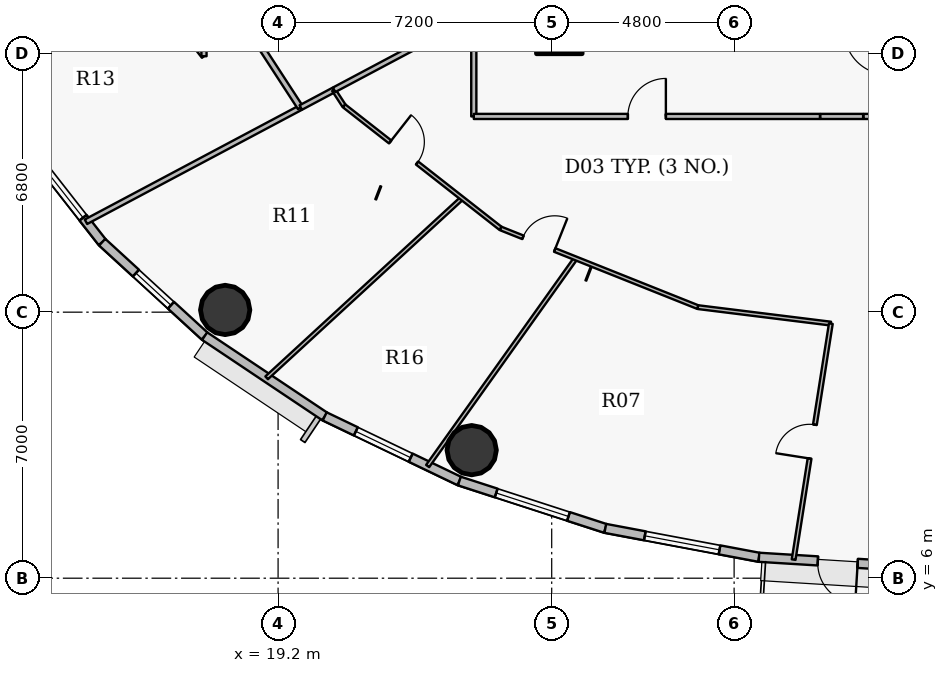
"""IFC4 building model, lengths in metres.
Left out: names, types, materials, properties, quantities, classifications, styles, units other than length and angle.
Written with IfcOpenShell. Run it as: python <this file> out.ifc"""

import sys

from ifc_helpers import new_model, si_unit, direction, frame, frame_2d, origin, origin_2d, place, context, subcontext, project, spatial, rectangle, hollow_circle, extrude, source, transform, mapped, element, fill, save


model = new_model("IFC4")
c1 = context("Model", 3, precision=1e-05, world=origin(), true_north=direction((0.0, 1.0)))
c2 = subcontext(c1, "Body", "Model", "MODEL_VIEW")
j1 = project(units=[si_unit("LENGTHUNIT", "METRE"), si_unit("PLANEANGLEUNIT", "RADIAN")], contexts=[c1])
p1 = place(None, origin())
s1 = spatial("IfcSite", under=j1, at=p1, CompositionType="ELEMENT")
p2 = place(p1, origin())
s2 = spatial("IfcBuilding", under=s1, at=p2, CompositionType="ELEMENT")
p3 = place(p2, frame((0.0, 0.0, 193.65)))
s3 = spatial("IfcBuildingStorey", under=s2, at=p3, CompositionType="ELEMENT", Elevation=193.65)
p4 = place(p3, frame((26.6, 20.4, 0.0), z_axis=(0.0, 0.0, 1.0), x_axis=(1.0, 0.0, 0.0)))
e1 = element("IfcColumn", 1, at=p4, inside=s3, PredefinedType="COLUMN", context=c2, shape_type="SweptSolid", body=[
    extrude(rectangle(XDim=1.2, YDim=1.2, at=origin_2d()), origin(), (0.0, 0.0, 1.0), 3.75),
])
for number, where, z_axis, x_axis in (
    (2, (17.808, 13.058, 0.0), (0.0, 0.0, 1.0), (1.0, 0.0, 0.0)),
    (3, (24.294, 9.369, 0.0), (0.0, 0.0, 1.0), (1.0, 0.0, 0.0)),
):
    element("IfcColumn", number, at=place(p3, frame(where, z_axis=z_axis, x_axis=x_axis)), inside=s3, PredefinedType="COLUMN", context=c2, shape_type="SweptSolid", body=[
        extrude(hollow_circle(Radius=0.65, WallThickness=0.04, at=origin_2d()), origin(), (0.0, 0.0, 1.0), 3.75),
    ])
p5 = place(p3, frame((14.572, 14.842, 0.0), z_axis=(0.0, 0.0, 1.0), x_axis=(-0.616287674549, 0.787521112224, 0.0)))
e4 = element("IfcWall", 4, at=p5, inside=s3, PredefinedType="SOLIDWALL", context=c2, shape_type="SweptSolid", body=[
    extrude(rectangle(XDim=3.517, YDim=0.24, at=frame_2d((1.759, 0.0))), origin(), (0.0, 0.0, 1.0), 3.5),
])
p6 = place(p5, frame((0.819, 0.0, 0.9)))
e5 = element("IfcOpeningElement", 5, at=p6, cuts=e4, PredefinedType="OPENING", context=c2, shape_type="SweptSolid", body=[
    extrude(rectangle(XDim=2.0, YDim=1.75, at=origin_2d()), frame((1.0, 0.13, 0.875), z_axis=(0.0, -1.0, 0.0), x_axis=(1.0, 0.0, 0.0)), (0.0, 0.0, 1.0), 0.26),
])
p7 = place(p3, frame((17.268, 12.369, 0.0), z_axis=(0.0, 0.0, 1.0), x_axis=(-0.737076565834, 0.675809245349, 0.0)))
e6 = element("IfcWall", 6, at=p7, inside=s3, PredefinedType="SOLIDWALL", context=c2, shape_type="SweptSolid", body=[
    extrude(rectangle(XDim=3.658, YDim=0.24, at=frame_2d((1.829, 0.0))), origin(), (0.0, 0.0, 1.0), 3.5),
])
p8 = place(p7, frame((1.204, 0.0, 0.9)))
e7 = element("IfcOpeningElement", 7, at=p8, cuts=e6, PredefinedType="OPENING", context=c2, shape_type="SweptSolid", body=[
    extrude(rectangle(XDim=1.25, YDim=1.65, at=origin_2d()), frame((0.625, 0.13, 0.825), z_axis=(0.0, -1.0, 0.0), x_axis=(1.0, 0.0, 0.0)), (0.0, 0.0, 1.0), 0.26),
])
p9 = place(p3, frame((20.427, 10.257, 0.0), z_axis=(0.0, 0.0, 1.0), x_axis=(-0.831228998277, 0.555930168657, 0.0)))
e8 = element("IfcWall", 8, at=p9, inside=s3, PredefinedType="SOLIDWALL", context=c2, shape_type="SweptSolid", body=[
    extrude(rectangle(XDim=3.8, YDim=0.24, at=frame_2d((1.9, 0.0))), origin(), (0.0, 0.0, 1.0), 3.5),
])
p10 = place(p3, frame((23.97, 8.556, 0.0), z_axis=(0.0, 0.0, 1.0), x_axis=(-0.901564733809, 0.432644231155, 0.0)))
e9 = element("IfcWall", 9, at=p10, inside=s3, PredefinedType="SOLIDWALL", context=c2, shape_type="SweptSolid", body=[
    extrude(rectangle(XDim=3.93, YDim=0.24, at=frame_2d((1.965, 0.0))), origin(), (0.0, 0.0, 1.0), 3.5),
])
p11 = place(p10, frame((1.421, 0.0, 0.9)))
e10 = element("IfcOpeningElement", 10, at=p11, cuts=e9, PredefinedType="OPENING", context=c2, shape_type="SweptSolid", body=[
    extrude(rectangle(XDim=1.6, YDim=1.75, at=origin_2d()), frame((0.8, 0.13, 0.875), z_axis=(0.0, -1.0, 0.0), x_axis=(1.0, 0.0, 0.0)), (0.0, 0.0, 1.0), 0.26),
])
p12 = place(p3, frame((27.811, 7.311, 0.0), z_axis=(0.0, 0.0, 1.0), x_axis=(-0.951209870236, 0.30854462038, 0.0)))
e11 = element("IfcWall", 11, at=p12, inside=s3, PredefinedType="SOLIDWALL", context=c2, shape_type="SweptSolid", body=[
    extrude(rectangle(XDim=4.038, YDim=0.24, at=frame_2d((2.019, 0.0))), origin(), (0.0, 0.0, 1.0), 3.5),
])
p13 = place(p12, frame((1.019, 0.0, 0.9)))
e12 = element("IfcOpeningElement", 12, at=p13, cuts=e11, PredefinedType="OPENING", context=c2, shape_type="SweptSolid", body=[
    extrude(rectangle(XDim=2.0, YDim=1.75, at=origin_2d()), frame((1.0, 0.13, 0.875), z_axis=(0.0, -1.0, 0.0), x_axis=(1.0, 0.0, 0.0)), (0.0, 0.0, 1.0), 0.26),
])
p14 = place(p3, frame((31.854, 6.551, 0.0), z_axis=(0.0, 0.0, 1.0), x_axis=(-0.982788108205, 0.184736391573, 0.0)))
e13 = element("IfcWall", 13, at=p14, inside=s3, PredefinedType="SOLIDWALL", context=c2, shape_type="SweptSolid", body=[
    extrude(rectangle(XDim=4.114, YDim=0.24, at=frame_2d((2.057, 0.0))), origin(), (0.0, 0.0, 1.0), 3.5),
])
p15 = place(p14, frame((1.057, 0.0, 0.9)))
e14 = element("IfcOpeningElement", 14, at=p15, cuts=e13, PredefinedType="OPENING", context=c2, shape_type="SweptSolid", body=[
    extrude(rectangle(XDim=2.0, YDim=1.75, at=origin_2d()), frame((1.0, 0.13, 0.875), z_axis=(0.0, -1.0, 0.0), x_axis=(1.0, 0.0, 0.0)), (0.0, 0.0, 1.0), 0.26),
])
p16 = place(p3, frame((36.0, 6.295, 0.0), z_axis=(0.0, 0.0, 1.0), x_axis=(-0.998104600619, 0.061540281305, 0.0)))
e15 = element("IfcWall", 15, at=p16, inside=s3, PredefinedType="SOLIDWALL", context=c2, shape_type="SweptSolid", body=[
    extrude(rectangle(XDim=4.154, YDim=0.24, at=frame_2d((2.077, 0.0))), origin(), (0.0, 0.0, 1.0), 3.5),
])
p17 = place(p16, frame((1.552, 0.0, 0.0)))
e16 = element("IfcOpeningElement", 16, at=p17, cuts=e15, PredefinedType="OPENING", context=c2, shape_type="SweptSolid", body=[
    extrude(rectangle(XDim=1.05, YDim=2.15, at=origin_2d()), frame((0.525, 0.13, 1.075), z_axis=(0.0, -1.0, 0.0), x_axis=(1.0, 0.0, 0.0)), (0.0, 0.0, 1.0), 0.26),
])
p18 = place(p3, frame((14.145, 15.379, 0.0), z_axis=(0.0, 0.0, 1.0), x_axis=(0.882932689309, 0.469499591214, 0.0)))
e17 = element("IfcWall", 17, at=p18, inside=s3, PredefinedType="PARTITIONING", context=c2, shape_type="SweptSolid", body=[
    extrude(rectangle(XDim=6.392, YDim=0.135, at=frame_2d((3.196, 0.0))), origin(), (0.0, 0.0, 1.0), 2.935),
])
p19 = place(p3, frame((16.72, 20.411, 0.0), z_axis=(0.0, 0.0, 1.0), x_axis=(0.616377221056, -0.787451027914, 0.0)))
e18 = element("IfcWall", 18, at=p19, inside=s3, PredefinedType="PARTITIONING", context=c2, shape_type="SweptSolid", body=[
    extrude(rectangle(XDim=0.859, YDim=0.135, at=frame_2d((0.43, 0.0))), origin(), (0.0, 0.0, 1.0), 3.5),
])
p20 = place(p3, frame((17.25, 19.734, 0.0), z_axis=(0.0, 0.0, 1.0), x_axis=(0.0, 1.0, 0.0)))
e19 = element("IfcWall", 19, at=p20, inside=s3, PredefinedType="PARTITIONING", context=c2, shape_type="SweptSolid", body=[
    extrude(rectangle(XDim=2.548, YDim=0.135, at=frame_2d((1.274, 0.0))), origin(), (0.0, 0.0, 1.0), 2.935),
])
p21 = place(p20, frame((0.864, 0.0, 0.0)))
e20 = element("IfcOpeningElement", 20, at=p21, cuts=e19, PredefinedType="OPENING", context=c2, shape_type="SweptSolid", body=[
    extrude(rectangle(XDim=0.82, YDim=2.1, at=origin_2d()), frame((0.41, 0.078, 1.05), z_axis=(0.0, -1.0, 0.0), x_axis=(1.0, 0.0, 0.0)), (0.0, 0.0, 1.0), 0.155),
])
p22 = place(p3, frame((17.279, 22.237, 0.0), z_axis=(0.0, 0.0, 1.0), x_axis=(0.545383699519, -0.83818650687, 0.0)))
e21 = element("IfcWall", 21, at=p22, inside=s3, PredefinedType="PARTITIONING", context=c2, shape_type="SweptSolid", body=[
    extrude(rectangle(XDim=4.601, YDim=0.15, at=frame_2d((2.3, 0.0))), origin(), (0.0, 0.0, 1.0), 2.935),
])
p23 = place(p3, frame((18.899, 11.272, 0.0), z_axis=(0.0, 0.0, 1.0), x_axis=(0.736047362481, 0.676930040834, 0.0)))
e22 = element("IfcWall", 22, at=p23, inside=s3, PredefinedType="PARTITIONING", context=c2, shape_type="SweptSolid", body=[
    extrude(rectangle(XDim=6.983, YDim=0.1, at=frame_2d((3.492, 0.0))), origin(), (0.0, 0.0, 1.0), 2.935),
])
p24 = place(p3, frame((19.798, 18.385, 0.0), z_axis=(0.0, 0.0, 1.0), x_axis=(0.882964446326, 0.469439864652, 0.0)))
e23 = element("IfcWall", 23, at=p24, inside=s3, PredefinedType="PARTITIONING", context=c2, shape_type="SweptSolid", body=[
    extrude(rectangle(XDim=0.982, YDim=0.135, at=frame_2d((0.491, 0.0))), origin(), (0.0, 0.0, 1.0), 3.5),
])
p25 = place(p3, frame((20.665, 18.846, 0.0), z_axis=(0.0, 0.0, 1.0), x_axis=(0.545143704476, -0.838342615802, 0.0)))
e24 = element("IfcWall", 24, at=p25, inside=s3, PredefinedType="PARTITIONING", context=c2, shape_type="SweptSolid", body=[
    extrude(rectangle(XDim=0.497, YDim=0.1, at=frame_2d((0.249, 0.0))), origin(), (0.0, 0.0, 1.0), 3.5),
])
p26 = place(p3, frame((20.674, 18.851, 0.0), z_axis=(0.0, 0.0, 1.0), x_axis=(0.882934968765, 0.469495304483, 0.0)))
e25 = element("IfcWall", 25, at=p26, inside=s3, PredefinedType="PARTITIONING", context=c2, shape_type="SweptSolid", body=[
    extrude(rectangle(XDim=4.164, YDim=0.135, at=frame_2d((2.082, 0.0))), origin(), (0.0, 0.0, 1.0), 3.5),
])
p27 = place(p3, frame((20.936, 18.429, 0.0), z_axis=(0.0, 0.0, 1.0), x_axis=(0.787322805473, -0.61654099619, 0.0)))
e26 = element("IfcWall", 26, at=p27, inside=s3, PredefinedType="PARTITIONING", context=c2, shape_type="SweptSolid", body=[
    extrude(rectangle(XDim=5.232, YDim=0.1, at=frame_2d((2.616, 0.0))), origin(), (0.0, 0.0, 1.0), 2.935),
])
p28 = place(p27, frame((1.541, 0.0, 0.0)))
e27 = element("IfcOpeningElement", 27, at=p28, cuts=e26, PredefinedType="OPENING", context=c2, shape_type="SweptSolid", body=[
    extrude(rectangle(XDim=0.9, YDim=2.1, at=origin_2d()), frame((0.45, 0.06, 1.05), z_axis=(0.0, -1.0, 0.0), x_axis=(1.0, 0.0, 0.0)), (0.0, 0.0, 1.0), 0.12),
])
p29 = place(p3, frame((23.136, 8.951, 0.0), z_axis=(0.0, 0.0, 1.0), x_axis=(0.580415349728, 0.814320589081, 0.0)))
e28 = element("IfcWall", 28, at=p29, inside=s3, PredefinedType="PARTITIONING", context=c2, shape_type="SweptSolid", body=[
    extrude(rectangle(XDim=6.71, YDim=0.1, at=frame_2d((3.355, 0.0))), origin(), (0.0, 0.0, 1.0), 2.935),
])
p30 = place(p3, frame((24.35, 18.15, 0.0), z_axis=(0.0, 0.0, 1.0), x_axis=(0.0, 1.0, 0.0)))
e29 = element("IfcWall", 29, at=p30, inside=s3, PredefinedType="PARTITIONING", context=c2, shape_type="SweptSolid", body=[
    extrude(rectangle(XDim=5.963, YDim=0.135, at=frame_2d((2.981, 0.0))), origin(), (0.0, 0.0, 1.0), 2.935),
])
p31 = place(p30, frame((3.879, 0.0, 0.0)))
e30 = element("IfcOpeningElement", 30, at=p31, cuts=e29, PredefinedType="OPENING", context=c2, shape_type="SweptSolid", body=[
    extrude(rectangle(XDim=0.82, YDim=2.1, at=origin_2d()), frame((0.41, 0.078, 1.05), z_axis=(0.0, -1.0, 0.0), x_axis=(1.0, 0.0, 0.0)), (0.0, 0.0, 1.0), 0.155),
])
p32 = place(p3, frame((24.35, 18.15, 0.0), z_axis=(0.0, 0.0, 1.0), x_axis=(1.0, 0.0, 0.0)))
e31 = element("IfcWall", 31, at=p32, inside=s3, PredefinedType="PARTITIONING", context=c2, shape_type="SweptSolid", body=[
    extrude(rectangle(XDim=9.109, YDim=0.135, at=frame_2d((4.554, 0.0))), origin(), (0.0, 0.0, 1.0), 2.935),
])
p33 = place(p32, frame((4.054, 0.0, 0.0)))
e32 = element("IfcOpeningElement", 32, at=p33, cuts=e31, PredefinedType="OPENING", context=c2, shape_type="SweptSolid", body=[
    extrude(rectangle(XDim=1.0, YDim=2.15, at=origin_2d()), frame((0.5, 0.078, 1.075), z_axis=(0.0, -1.0, 0.0), x_axis=(1.0, 0.0, 0.0)), (0.0, 0.0, 1.0), 0.155),
])
p34 = place(p3, frame((25.055, 15.204, 0.0), z_axis=(0.0, 0.0, 1.0), x_axis=(0.928798710424, -0.370584613166, 0.0)))
e33 = element("IfcWall", 33, at=p34, inside=s3, PredefinedType="PARTITIONING", context=c2, shape_type="SweptSolid", body=[
    extrude(rectangle(XDim=5.589, YDim=0.1, at=frame_2d((2.794, 0.0))), origin(), (0.0, 0.0, 1.0), 2.935),
])
p35 = place(p34, frame((0.633, 0.0, 0.0)))
e34 = element("IfcOpeningElement", 34, at=p35, cuts=e33, PredefinedType="OPENING", context=c2, shape_type="SweptSolid", body=[
    extrude(rectangle(XDim=0.9, YDim=2.1, at=origin_2d()), frame((0.45, 0.06, 1.05), z_axis=(0.0, -1.0, 0.0), x_axis=(1.0, 0.0, 0.0)), (0.0, 0.0, 1.0), 0.12),
])
p36 = place(p3, frame((30.246, 13.133, 0.0), z_axis=(0.0, 0.0, 1.0), x_axis=(0.992402005927, -0.123037630959, 0.0)))
e35 = element("IfcWall", 35, at=p36, inside=s3, PredefinedType="PARTITIONING", context=c2, shape_type="SweptSolid", body=[
    extrude(rectangle(XDim=3.526, YDim=0.1, at=frame_2d((1.763, 0.0))), origin(), (0.0, 0.0, 1.0), 3.5),
])
p37 = place(p3, frame((32.766, 6.489, 0.0), z_axis=(0.0, 0.0, 1.0), x_axis=(0.155739200194, 0.987798208909, 0.0)))
e36 = element("IfcWall", 36, at=p37, inside=s3, PredefinedType="PARTITIONING", context=c2, shape_type="SweptSolid", body=[
    extrude(rectangle(XDim=6.286, YDim=0.1, at=frame_2d((3.143, 0.0))), origin(), (0.0, 0.0, 1.0), 2.935),
])
p38 = place(p37, frame((2.693, 0.0, 0.0)))
e37 = element("IfcOpeningElement", 37, at=p38, cuts=e36, PredefinedType="OPENING", context=c2, shape_type="SweptSolid", body=[
    extrude(rectangle(XDim=0.9, YDim=2.1, at=origin_2d()), frame((0.45, 0.06, 1.05), z_axis=(0.0, -1.0, 0.0), x_axis=(1.0, 0.0, 0.0)), (0.0, 0.0, 1.0), 0.12),
])
p39 = place(p3, frame((34.605, 18.15, 0.0), z_axis=(0.0, 0.0, 1.0), x_axis=(1.0, 0.0, 0.0)))
e38 = element("IfcWall", 38, at=p39, inside=s3, PredefinedType="PARTITIONING", context=c2, shape_type="SweptSolid", body=[
    extrude(rectangle(XDim=13.595, YDim=0.135, at=frame_2d((6.798, 0.0))), origin(), (0.0, 0.0, 1.0), 2.935),
])
p40 = place(p3, frame((34.595, 18.15, 0.0), z_axis=(0.0, 0.0, 1.0), x_axis=(-1.0, 0.0, 0.0)))
e39 = element("IfcWall", 39, at=p40, inside=s3, PredefinedType="PARTITIONING", context=c2, shape_type="SweptSolid", body=[
    extrude(rectangle(XDim=1.126, YDim=0.135, at=frame_2d((0.563, 0.0))), origin(), (0.0, 0.0, 1.0), 3.5),
])
m1 = source(origin(), c2, "Body", "SweptSolid", [
    extrude(rectangle(XDim=2.0, YDim=1.75, at=origin_2d()), frame((1.0, 0.03, 0.875), z_axis=(0.0, -1.0, 0.0), x_axis=(1.0, 0.0, 0.0)), (0.0, 0.0, 1.0), 0.06),
])
p41 = place(p6, origin())
e40 = element("IfcWindow", 40, at=p41, inside=s3, PartitioningType="DOUBLE_PANEL_VERTICAL", PredefinedType="WINDOW", context=c2, shape_type="MappedRepresentation", body=[
    mapped(m1, transform((0.0, 0.0, 0.0), x_axis=(1.0, 0.0, 0.0), y_axis=(0.0, 1.0, 0.0), z_axis=(0.0, 0.0, 1.0), scale=1.0)),
])
fill(e5, e40)
m2 = source(origin(), c2, "Body", "SweptSolid", [
    extrude(rectangle(XDim=1.6, YDim=1.75, at=origin_2d()), frame((0.8, 0.03, 0.875), z_axis=(0.0, -1.0, 0.0), x_axis=(1.0, 0.0, 0.0)), (0.0, 0.0, 1.0), 0.06),
])
p42 = place(p11, origin())
e41 = element("IfcWindow", 41, at=p42, inside=s3, PartitioningType="DOUBLE_PANEL_VERTICAL", PredefinedType="WINDOW", context=c2, shape_type="MappedRepresentation", body=[
    mapped(m2, transform((0.0, 0.0, 0.0), x_axis=(1.0, 0.0, 0.0), y_axis=(0.0, 1.0, 0.0), z_axis=(0.0, 0.0, 1.0), scale=1.0)),
])
fill(e10, e41)
p43 = place(p13, origin())
e42 = element("IfcWindow", 42, at=p43, inside=s3, PartitioningType="DOUBLE_PANEL_VERTICAL", PredefinedType="WINDOW", context=c2, shape_type="MappedRepresentation", body=[
    mapped(m1, transform((0.0, 0.0, 0.0), x_axis=(1.0, 0.0, 0.0), y_axis=(0.0, 1.0, 0.0), z_axis=(0.0, 0.0, 1.0), scale=1.0)),
])
fill(e12, e42)
p44 = place(p15, origin())
e43 = element("IfcWindow", 43, at=p44, inside=s3, PartitioningType="DOUBLE_PANEL_VERTICAL", PredefinedType="WINDOW", context=c2, shape_type="MappedRepresentation", body=[
    mapped(m1, transform((0.0, 0.0, 0.0), x_axis=(1.0, 0.0, 0.0), y_axis=(0.0, 1.0, 0.0), z_axis=(0.0, 0.0, 1.0), scale=1.0)),
])
fill(e14, e43)
m3 = source(origin(), c2, "Body", "SweptSolid", [
    extrude(rectangle(XDim=1.05, YDim=2.15, at=origin_2d()), frame((0.525, 0.025, 1.075), z_axis=(0.0, -1.0, 0.0), x_axis=(1.0, 0.0, 0.0)), (0.0, 0.0, 1.0), 0.05),
])
p45 = place(p17, origin())
e44 = element("IfcDoor", 44, at=p45, inside=s3, OperationType="SINGLE_SWING_LEFT", PredefinedType="DOOR", context=c2, shape_type="MappedRepresentation", body=[
    mapped(m3, transform((0.0, 0.0, 0.0), x_axis=(1.0, 0.0, 0.0), y_axis=(0.0, 1.0, 0.0), z_axis=(0.0, 0.0, 1.0), scale=1.0)),
])
fill(e16, e44)
m4 = source(origin(), c2, "Body", "SweptSolid", [
    extrude(rectangle(XDim=1.25, YDim=1.65, at=origin_2d()), frame((0.625, 0.03, 0.825), z_axis=(0.0, -1.0, 0.0), x_axis=(1.0, 0.0, 0.0)), (0.0, 0.0, 1.0), 0.06),
])
p46 = place(p8, origin())
e45 = element("IfcWindow", 45, at=p46, inside=s3, PartitioningType="SINGLE_PANEL", PredefinedType="WINDOW", context=c2, shape_type="MappedRepresentation", body=[
    mapped(m4, transform((0.0, 0.0, 0.0), x_axis=(1.0, 0.0, 0.0), y_axis=(0.0, 1.0, 0.0), z_axis=(0.0, 0.0, 1.0), scale=1.0)),
])
fill(e7, e45)
m5 = source(origin(), c2, "Body", "SweptSolid", [
    extrude(rectangle(XDim=1.0, YDim=2.15, at=origin_2d()), frame((0.5, 0.025, 1.075), z_axis=(0.0, -1.0, 0.0), x_axis=(1.0, 0.0, 0.0)), (0.0, 0.0, 1.0), 0.05),
])
p47 = place(p33, origin())
e46 = element("IfcDoor", 46, at=p47, inside=s3, OperationType="SINGLE_SWING_RIGHT", PredefinedType="DOOR", context=c2, shape_type="MappedRepresentation", body=[
    mapped(m5, transform((0.0, 0.0, 0.0), x_axis=(1.0, 0.0, 0.0), y_axis=(0.0, 1.0, 0.0), z_axis=(0.0, 0.0, 1.0), scale=1.0)),
])
fill(e32, e46)
m6 = source(origin(), c2, "Body", "SweptSolid", [
    extrude(rectangle(XDim=0.9, YDim=2.1, at=origin_2d()), frame((0.45, 0.025, 1.05), z_axis=(0.0, -1.0, 0.0), x_axis=(1.0, 0.0, 0.0)), (0.0, 0.0, 1.0), 0.05),
])
p48 = place(p28, origin())
e47 = element("IfcDoor", 47, at=p48, inside=s3, OperationType="SINGLE_SWING_LEFT", PredefinedType="DOOR", context=c2, shape_type="MappedRepresentation", body=[
    mapped(m6, transform((0.0, 0.0, 0.0), x_axis=(1.0, 0.0, 0.0), y_axis=(0.0, 1.0, 0.0), z_axis=(0.0, 0.0, 1.0), scale=1.0)),
])
fill(e27, e47)
p49 = place(p35, origin())
e48 = element("IfcDoor", 48, at=p49, inside=s3, OperationType="SINGLE_SWING_RIGHT", PredefinedType="DOOR", context=c2, shape_type="MappedRepresentation", body=[
    mapped(m6, transform((0.0, 0.0, 0.0), x_axis=(1.0, 0.0, 0.0), y_axis=(0.0, 1.0, 0.0), z_axis=(0.0, 0.0, 1.0), scale=1.0)),
])
fill(e34, e48)
p50 = place(p38, origin())
e49 = element("IfcDoor", 49, at=p50, inside=s3, OperationType="SINGLE_SWING_LEFT", PredefinedType="DOOR", context=c2, shape_type="MappedRepresentation", body=[
    mapped(m6, transform((0.0, 0.0, 0.0), x_axis=(1.0, 0.0, 0.0), y_axis=(0.0, 1.0, 0.0), z_axis=(0.0, 0.0, 1.0), scale=1.0)),
])
fill(e37, e49)
save(model, sys.argv[1])
